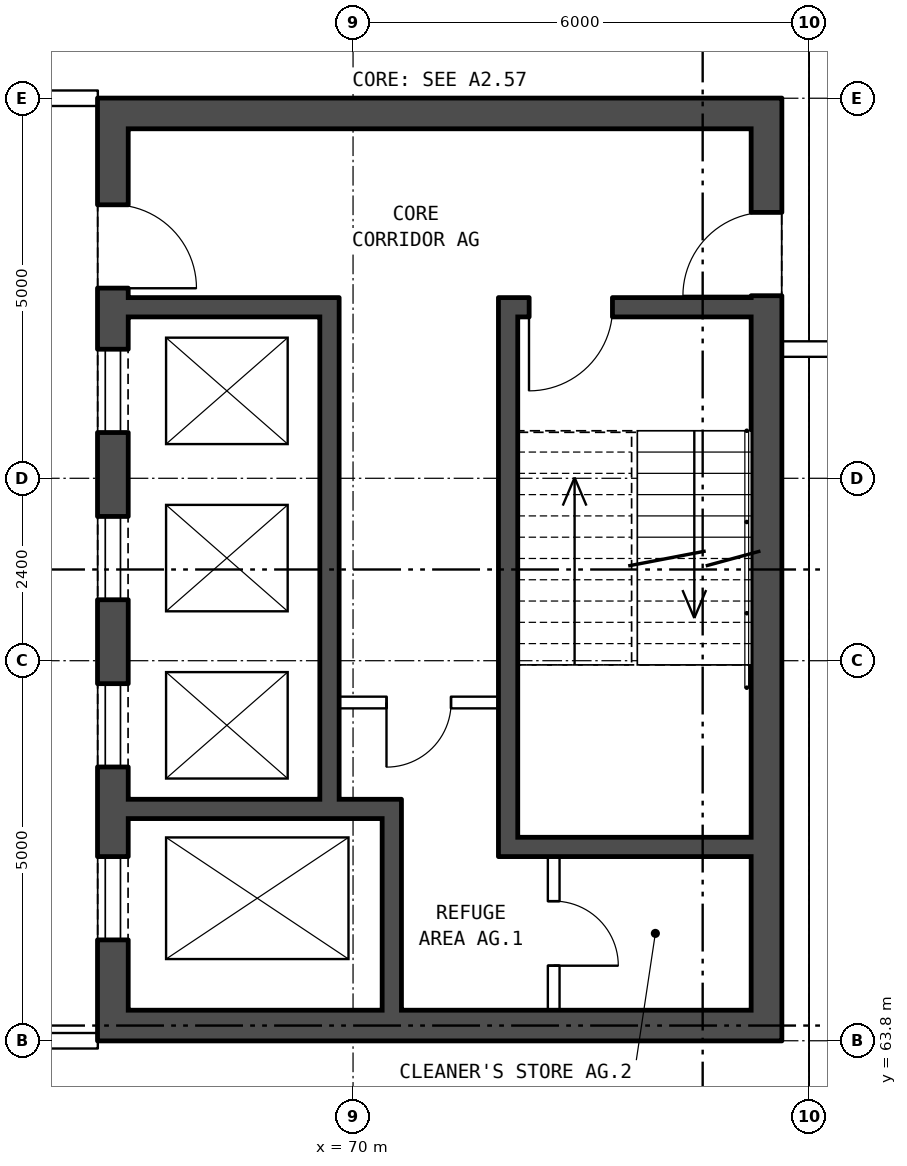
"""IFC4 building model, lengths in metres.
Left out: names, types, materials, properties, quantities, classifications, styles, units other than length and angle.
Written with IfcOpenShell. Run it as: python <this file> out.ifc"""

import sys

from ifc_helpers import new_model, si_unit, direction, frame, frame_2d, origin, place, context, subcontext, project, spatial, rectangle, extrude, element, fill, save


model = new_model("IFC4")
c1 = context("Model", 3, precision=1e-05, world=origin(), true_north=direction((0.0, 1.0)))
c2 = subcontext(c1, "Body", "Model", "MODEL_VIEW")
j1 = project(units=[si_unit("LENGTHUNIT", "METRE"), si_unit("PLANEANGLEUNIT", "RADIAN")], contexts=[c1])
p1 = place(None, origin())
s1 = spatial("IfcSite", under=j1, at=p1, CompositionType="ELEMENT")
p2 = place(p1, origin())
s2 = spatial("IfcBuilding", under=s1, at=p2, CompositionType="ELEMENT")
p3 = place(p2, frame((0.0, 0.0, 198.6)))
s3 = spatial("IfcBuildingStorey", under=s2, at=p3, CompositionType="ELEMENT", Elevation=198.6)
p4 = place(p3, frame((66.84, 63.8, 0.0), z_axis=(0.0, 0.0, 1.0), x_axis=(0.0, 1.0, 0.0)))
e1 = element("IfcWall", 1, at=p4, inside=s3, PredefinedType="SHEAR", context=c2, shape_type="SweptSolid", body=[
    extrude(rectangle(XDim=12.4, YDim=0.4, at=frame_2d((6.2, 0.0))), origin(), (0.0, 0.0, 1.0), 3.7),
])
p5 = place(p4, frame((1.325, 0.0, 0.0)))
e2 = element("IfcOpeningElement", 2, at=p5, cuts=e1, PredefinedType="OPENING", context=c2, shape_type="SweptSolid", body=[
    extrude(rectangle(XDim=1.1, YDim=2.1, at=frame_2d((0.55, 1.05))), frame((0.0, 0.21, 0.0), z_axis=(0.0, -1.0, 0.0), x_axis=(1.0, 0.0, 0.0)), (0.0, 0.0, 1.0), 0.42),
])
p6 = place(p4, frame((3.6, 0.0, 0.0)))
e3 = element("IfcOpeningElement", 3, at=p6, cuts=e1, PredefinedType="OPENING", context=c2, shape_type="SweptSolid", body=[
    extrude(rectangle(XDim=1.1, YDim=2.1, at=frame_2d((0.55, 1.05))), frame((0.0, 0.21, 0.0), z_axis=(0.0, -1.0, 0.0), x_axis=(1.0, 0.0, 0.0)), (0.0, 0.0, 1.0), 0.42),
])
p7 = place(p4, frame((5.8, 0.0, 0.0)))
e4 = element("IfcOpeningElement", 4, at=p7, cuts=e1, PredefinedType="OPENING", context=c2, shape_type="SweptSolid", body=[
    extrude(rectangle(XDim=1.1, YDim=2.1, at=frame_2d((0.55, 1.05))), frame((0.0, 0.21, 0.0), z_axis=(0.0, -1.0, 0.0), x_axis=(1.0, 0.0, 0.0)), (0.0, 0.0, 1.0), 0.42),
])
p8 = place(p4, frame((8.0, 0.0, 0.0)))
e5 = element("IfcOpeningElement", 5, at=p8, cuts=e1, PredefinedType="OPENING", context=c2, shape_type="SweptSolid", body=[
    extrude(rectangle(XDim=1.1, YDim=2.1, at=frame_2d((0.55, 1.05))), frame((0.0, 0.21, 0.0), z_axis=(0.0, -1.0, 0.0), x_axis=(1.0, 0.0, 0.0)), (0.0, 0.0, 1.0), 0.42),
])
p9 = place(p4, frame((9.9, 0.0, 0.0)))
e6 = element("IfcOpeningElement", 6, at=p9, cuts=e1, PredefinedType="OPENING", context=c2, shape_type="SweptSolid", body=[
    extrude(rectangle(XDim=1.1, YDim=2.1, at=frame_2d((0.55, 1.05))), frame((0.0, 0.21, 0.0), z_axis=(0.0, -1.0, 0.0), x_axis=(1.0, 0.0, 0.0)), (0.0, 0.0, 1.0), 0.42),
])
p10 = place(p3, frame((75.44, 63.8, 0.0), z_axis=(0.0, 0.0, 1.0), x_axis=(0.0, 1.0, 0.0)))
e7 = element("IfcWall", 7, at=p10, inside=s3, PredefinedType="SHEAR", context=c2, shape_type="SweptSolid", body=[
    extrude(rectangle(XDim=12.4, YDim=0.4, at=frame_2d((6.2, 0.0))), origin(), (0.0, 0.0, 1.0), 3.7),
])
p11 = place(p10, frame((9.8, 0.0, 0.0)))
e8 = element("IfcOpeningElement", 8, at=p11, cuts=e7, PredefinedType="OPENING", context=c2, shape_type="SweptSolid", body=[
    extrude(rectangle(XDim=1.1, YDim=2.1, at=frame_2d((0.55, 1.05))), frame((0.0, 0.21, 0.0), z_axis=(0.0, -1.0, 0.0), x_axis=(1.0, 0.0, 0.0)), (0.0, 0.0, 1.0), 0.42),
])
for number, where, z_axis, x_axis in (
    (9, (67.04, 64.0, 0.0), (0.0, 0.0, 1.0), (1.0, 0.0, 0.0)),
    (10, (67.04, 76.0, 0.0), (0.0, 0.0, 1.0), (1.0, 0.0, 0.0)),
):
    element("IfcWall", number, at=place(p3, frame(where, z_axis=z_axis, x_axis=x_axis)), inside=s3, PredefinedType="SHEAR", context=c2, shape_type="SweptSolid", body=[
        extrude(rectangle(XDim=8.2, YDim=0.4, at=frame_2d((4.1, 0.0))), origin(), (0.0, 0.0, 1.0), 3.7),
    ])
p12 = place(p3, frame((72.165, 66.35, 0.0), z_axis=(0.0, 0.0, 1.0), x_axis=(1.0, 0.0, 0.0)))
e11 = element("IfcWall", 11, at=p12, inside=s3, PredefinedType="SHEAR", context=c2, shape_type="SweptSolid", body=[
    extrude(rectangle(XDim=3.075, YDim=0.25, at=frame_2d((1.538, 0.0))), origin(), (0.0, 0.0, 1.0), 3.7),
])
p13 = place(p3, frame((67.04, 66.85, 0.0), z_axis=(0.0, 0.0, 1.0), x_axis=(1.0, 0.0, 0.0)))
e12 = element("IfcWall", 12, at=p13, inside=s3, PredefinedType="SHEAR", context=c2, shape_type="SweptSolid", body=[
    extrude(rectangle(XDim=3.595, YDim=0.25, at=frame_2d((1.797, 0.0))), origin(), (0.0, 0.0, 1.0), 3.7),
])
p14 = place(p3, frame((69.815, 68.25, 0.0), z_axis=(0.0, 0.0, 1.0), x_axis=(1.0, 0.0, 0.0)))
e13 = element("IfcWall", 13, at=p14, inside=s3, PredefinedType="PARTITIONING", context=c2, shape_type="SweptSolid", body=[
    extrude(rectangle(XDim=2.1, YDim=0.15, at=frame_2d((1.05, 0.0))), origin(), (0.0, 0.0, 1.0), 3.7),
])
p15 = place(p14, frame((0.625, 0.0, 0.0)))
e14 = element("IfcOpeningElement", 14, at=p15, cuts=e13, PredefinedType="OPENING", context=c2, shape_type="SweptSolid", body=[
    extrude(rectangle(XDim=0.85, YDim=2.1, at=frame_2d((0.425, 1.05))), frame((0.0, 0.085, 0.0), z_axis=(0.0, -1.0, 0.0), x_axis=(1.0, 0.0, 0.0)), (0.0, 0.0, 1.0), 0.17),
])
p16 = place(p3, frame((67.04, 73.45, 0.0), z_axis=(0.0, 0.0, 1.0), x_axis=(1.0, 0.0, 0.0)))
e15 = element("IfcWall", 15, at=p16, inside=s3, PredefinedType="SHEAR", context=c2, shape_type="SweptSolid", body=[
    extrude(rectangle(XDim=2.525, YDim=0.25, at=frame_2d((1.262, 0.0))), origin(), (0.0, 0.0, 1.0), 3.7),
])
p17 = place(p3, frame((72.165, 73.45, 0.0), z_axis=(0.0, 0.0, 1.0), x_axis=(1.0, 0.0, 0.0)))
e16 = element("IfcWall", 16, at=p17, inside=s3, PredefinedType="SHEAR", context=c2, shape_type="SweptSolid", body=[
    extrude(rectangle(XDim=3.075, YDim=0.25, at=frame_2d((1.538, 0.0))), origin(), (0.0, 0.0, 1.0), 3.7),
])
p18 = place(p17, frame((0.15, 0.0, 0.0)))
e17 = element("IfcOpeningElement", 17, at=p18, cuts=e16, PredefinedType="OPENING", context=c2, shape_type="SweptSolid", body=[
    extrude(rectangle(XDim=1.1, YDim=2.1, at=frame_2d((0.55, 1.05))), frame((0.0, 0.135, 0.0), z_axis=(0.0, -1.0, 0.0), x_axis=(1.0, 0.0, 0.0)), (0.0, 0.0, 1.0), 0.27),
])
p19 = place(p3, frame((69.69, 66.975, 0.0), z_axis=(0.0, 0.0, 1.0), x_axis=(0.0, 1.0, 0.0)))
e18 = element("IfcWall", 18, at=p19, inside=s3, PredefinedType="SHEAR", context=c2, shape_type="SweptSolid", body=[
    extrude(rectangle(XDim=6.6, YDim=0.25, at=frame_2d((3.3, 0.0))), origin(), (0.0, 0.0, 1.0), 3.7),
])
p20 = place(p3, frame((70.51, 64.2, 0.0), z_axis=(0.0, 0.0, 1.0), x_axis=(0.0, 1.0, 0.0)))
e19 = element("IfcWall", 19, at=p20, inside=s3, PredefinedType="SHEAR", context=c2, shape_type="SweptSolid", body=[
    extrude(rectangle(XDim=2.525, YDim=0.25, at=frame_2d((1.263, 0.0))), origin(), (0.0, 0.0, 1.0), 3.7),
])
p21 = place(p3, frame((72.04, 66.225, 0.0), z_axis=(0.0, 0.0, 1.0), x_axis=(0.0, 1.0, 0.0)))
e20 = element("IfcWall", 20, at=p21, inside=s3, PredefinedType="SHEAR", context=c2, shape_type="SweptSolid", body=[
    extrude(rectangle(XDim=7.35, YDim=0.25, at=frame_2d((3.675, 0.0))), origin(), (0.0, 0.0, 1.0), 3.7),
])
p22 = place(p3, frame((72.64, 64.2, 0.0), z_axis=(0.0, 0.0, 1.0), x_axis=(0.0, 1.0, 0.0)))
e21 = element("IfcWall", 21, at=p22, inside=s3, PredefinedType="PARTITIONING", context=c2, shape_type="SweptSolid", body=[
    extrude(rectangle(XDim=2.025, YDim=0.15, at=frame_2d((1.013, 0.0))), origin(), (0.0, 0.0, 1.0), 3.7),
])
p23 = place(p22, frame((0.587, 0.0, 0.0)))
e22 = element("IfcOpeningElement", 22, at=p23, cuts=e21, PredefinedType="OPENING", context=c2, shape_type="SweptSolid", body=[
    extrude(rectangle(XDim=0.85, YDim=2.1, at=frame_2d((0.425, 1.05))), frame((0.0, 0.085, 0.0), z_axis=(0.0, -1.0, 0.0), x_axis=(1.0, 0.0, 0.0)), (0.0, 0.0, 1.0), 0.17),
])
p24 = place(p3, frame((63.64, 63.8, 0.0), z_axis=(0.0, 0.0, 1.0), x_axis=(1.0, 0.0, 0.0)))
e23 = element("IfcWall", 23, at=p24, inside=s3, PredefinedType="PARTITIONING", context=c2, shape_type="SweptSolid", body=[
    extrude(rectangle(XDim=3.0, YDim=0.2, at=frame_2d((1.5, 0.0))), origin(), (0.0, 0.0, 1.0), 3.7),
])
p25 = place(p24, frame((1.0, 0.0, 0.0)))
e24 = element("IfcOpeningElement", 24, at=p25, cuts=e23, PredefinedType="OPENING", context=c2, shape_type="SweptSolid", body=[
    extrude(rectangle(XDim=1.0, YDim=2.1, at=frame_2d((0.5, 1.05))), frame((0.0, 0.11, 0.0), z_axis=(0.0, -1.0, 0.0), x_axis=(1.0, 0.0, 0.0)), (0.0, 0.0, 1.0), 0.22),
])
p26 = place(p3, frame((75.64, 72.9, 0.0), z_axis=(0.0, 0.0, 1.0), x_axis=(1.0, 0.0, 0.0)))
e25 = element("IfcWall", 25, at=p26, inside=s3, PredefinedType="PARTITIONING", context=c2, shape_type="SweptSolid", body=[
    extrude(rectangle(XDim=55.72, YDim=0.2, at=frame_2d((27.86, 0.0))), origin(), (0.0, 0.0, 1.0), 3.7),
])
p27 = place(p26, frame((6.555, 0.0, 0.0)))
e26 = element("IfcOpeningElement", 26, at=p27, cuts=e25, PredefinedType="OPENING", context=c2, shape_type="SweptSolid", body=[
    extrude(rectangle(XDim=1.0, YDim=2.1, at=frame_2d((0.5, 1.05))), frame((0.0, 0.11, 0.0), z_axis=(0.0, -1.0, 0.0), x_axis=(1.0, 0.0, 0.0)), (0.0, 0.0, 1.0), 0.22),
])
p28 = place(p26, frame((23.922, 0.0, 0.0)))
e27 = element("IfcOpeningElement", 27, at=p28, cuts=e25, PredefinedType="OPENING", context=c2, shape_type="SweptSolid", body=[
    extrude(rectangle(XDim=1.0, YDim=2.1, at=frame_2d((0.5, 1.05))), frame((0.0, 0.11, 0.0), z_axis=(0.0, -1.0, 0.0), x_axis=(1.0, 0.0, 0.0)), (0.0, 0.0, 1.0), 0.22),
])
p29 = place(p26, frame((44.728, 0.0, 0.0)))
e28 = element("IfcOpeningElement", 28, at=p29, cuts=e25, PredefinedType="OPENING", context=c2, shape_type="SweptSolid", body=[
    extrude(rectangle(XDim=1.0, YDim=2.1, at=frame_2d((0.5, 1.05))), frame((0.0, 0.11, 0.0), z_axis=(0.0, -1.0, 0.0), x_axis=(1.0, 0.0, 0.0)), (0.0, 0.0, 1.0), 0.22),
])
p30 = place(p3, frame((63.64, 76.2, 0.0), z_axis=(0.0, 0.0, 1.0), x_axis=(1.0, 0.0, 0.0)))
e29 = element("IfcWall", 29, at=p30, inside=s3, PredefinedType="PARTITIONING", context=c2, shape_type="SweptSolid", body=[
    extrude(rectangle(XDim=3.0, YDim=0.2, at=frame_2d((1.5, 0.0))), origin(), (0.0, 0.0, 1.0), 3.7),
])
p31 = place(p30, frame((1.0, 0.0, 0.0)))
e30 = element("IfcOpeningElement", 30, at=p31, cuts=e29, PredefinedType="OPENING", context=c2, shape_type="SweptSolid", body=[
    extrude(rectangle(XDim=1.0, YDim=2.1, at=frame_2d((0.5, 1.05))), frame((0.0, 0.11, 0.0), z_axis=(0.0, -1.0, 0.0), x_axis=(1.0, 0.0, 0.0)), (0.0, 0.0, 1.0), 0.22),
])
p32 = place(p5, origin())
e31 = element("IfcDoor", 31, at=p32, inside=s3, OperationType="DOUBLE_DOOR_SLIDING", PredefinedType="DOOR", context=c2, shape_type="SweptSolid", body=[
    extrude(rectangle(XDim=1.1, YDim=2.1, at=frame_2d((0.55, 1.05))), frame((0.0, -0.135, 0.0), z_axis=(0.0, -1.0, 0.0), x_axis=(1.0, 0.0, 0.0)), (0.0, 0.0, 1.0), 0.05),
])
fill(e2, e31)
p33 = place(p6, origin())
e32 = element("IfcDoor", 32, at=p33, inside=s3, OperationType="DOUBLE_DOOR_SLIDING", PredefinedType="DOOR", context=c2, shape_type="SweptSolid", body=[
    extrude(rectangle(XDim=1.1, YDim=2.1, at=frame_2d((0.55, 1.05))), frame((0.0, -0.135, 0.0), z_axis=(0.0, -1.0, 0.0), x_axis=(1.0, 0.0, 0.0)), (0.0, 0.0, 1.0), 0.05),
])
fill(e3, e32)
p34 = place(p7, origin())
e33 = element("IfcDoor", 33, at=p34, inside=s3, OperationType="DOUBLE_DOOR_SLIDING", PredefinedType="DOOR", context=c2, shape_type="SweptSolid", body=[
    extrude(rectangle(XDim=1.1, YDim=2.1, at=frame_2d((0.55, 1.05))), frame((0.0, -0.135, 0.0), z_axis=(0.0, -1.0, 0.0), x_axis=(1.0, 0.0, 0.0)), (0.0, 0.0, 1.0), 0.05),
])
fill(e4, e33)
p35 = place(p8, origin())
e34 = element("IfcDoor", 34, at=p35, inside=s3, OperationType="DOUBLE_DOOR_SLIDING", PredefinedType="DOOR", context=c2, shape_type="SweptSolid", body=[
    extrude(rectangle(XDim=1.1, YDim=2.1, at=frame_2d((0.55, 1.05))), frame((0.0, -0.135, 0.0), z_axis=(0.0, -1.0, 0.0), x_axis=(1.0, 0.0, 0.0)), (0.0, 0.0, 1.0), 0.05),
])
fill(e5, e34)
p36 = place(p9, frame((1.1, 0.0, 0.0), z_axis=(0.0, 0.0, 1.0), x_axis=(-1.0, 0.0, 0.0)))
e35 = element("IfcDoor", 35, at=p36, inside=s3, OperationType="SINGLE_SWING_RIGHT", PredefinedType="DOOR", context=c2, shape_type="SweptSolid", body=[
    extrude(rectangle(XDim=1.1, YDim=2.1, at=frame_2d((0.55, 1.05))), frame((0.0, 0.185, 0.0), z_axis=(0.0, -1.0, 0.0), x_axis=(1.0, 0.0, 0.0)), (0.0, 0.0, 1.0), 0.05),
])
fill(e6, e35)
p37 = place(p18, frame((1.1, 0.0, 0.0), z_axis=(0.0, 0.0, 1.0), x_axis=(-1.0, 0.0, 0.0)))
e36 = element("IfcDoor", 36, at=p37, inside=s3, OperationType="SINGLE_SWING_RIGHT", PredefinedType="DOOR", context=c2, shape_type="SweptSolid", body=[
    extrude(rectangle(XDim=1.1, YDim=2.1, at=frame_2d((0.55, 1.05))), frame((0.0, 0.025, 0.0), z_axis=(0.0, -1.0, 0.0), x_axis=(1.0, 0.0, 0.0)), (0.0, 0.0, 1.0), 0.05),
])
fill(e17, e36)
p38 = place(p15, frame((0.85, 0.0, 0.0), z_axis=(0.0, 0.0, 1.0), x_axis=(-1.0, 0.0, 0.0)))
e37 = element("IfcDoor", 37, at=p38, inside=s3, OperationType="SINGLE_SWING_RIGHT", PredefinedType="DOOR", context=c2, shape_type="SweptSolid", body=[
    extrude(rectangle(XDim=0.85, YDim=2.1, at=frame_2d((0.425, 1.05))), frame((0.0, 0.025, 0.0), z_axis=(0.0, -1.0, 0.0), x_axis=(1.0, 0.0, 0.0)), (0.0, 0.0, 1.0), 0.05),
])
fill(e14, e37)
p39 = place(p23, frame((0.85, 0.0, 0.0), z_axis=(0.0, 0.0, 1.0), x_axis=(-1.0, 0.0, 0.0)))
e38 = element("IfcDoor", 38, at=p39, inside=s3, OperationType="SINGLE_SWING_RIGHT", PredefinedType="DOOR", context=c2, shape_type="SweptSolid", body=[
    extrude(rectangle(XDim=0.85, YDim=2.1, at=frame_2d((0.425, 1.05))), frame((0.0, 0.025, 0.0), z_axis=(0.0, -1.0, 0.0), x_axis=(1.0, 0.0, 0.0)), (0.0, 0.0, 1.0), 0.05),
])
fill(e22, e38)
p40 = place(p11, origin())
e39 = element("IfcDoor", 39, at=p40, inside=s3, OperationType="SINGLE_SWING_LEFT", PredefinedType="DOOR", context=c2, shape_type="SweptSolid", body=[
    extrude(rectangle(XDim=1.1, YDim=2.1, at=frame_2d((0.55, 1.05))), frame((0.0, 0.185, 0.0), z_axis=(0.0, -1.0, 0.0), x_axis=(1.0, 0.0, 0.0)), (0.0, 0.0, 1.0), 0.05),
])
fill(e8, e39)
save(model, sys.argv[1])
